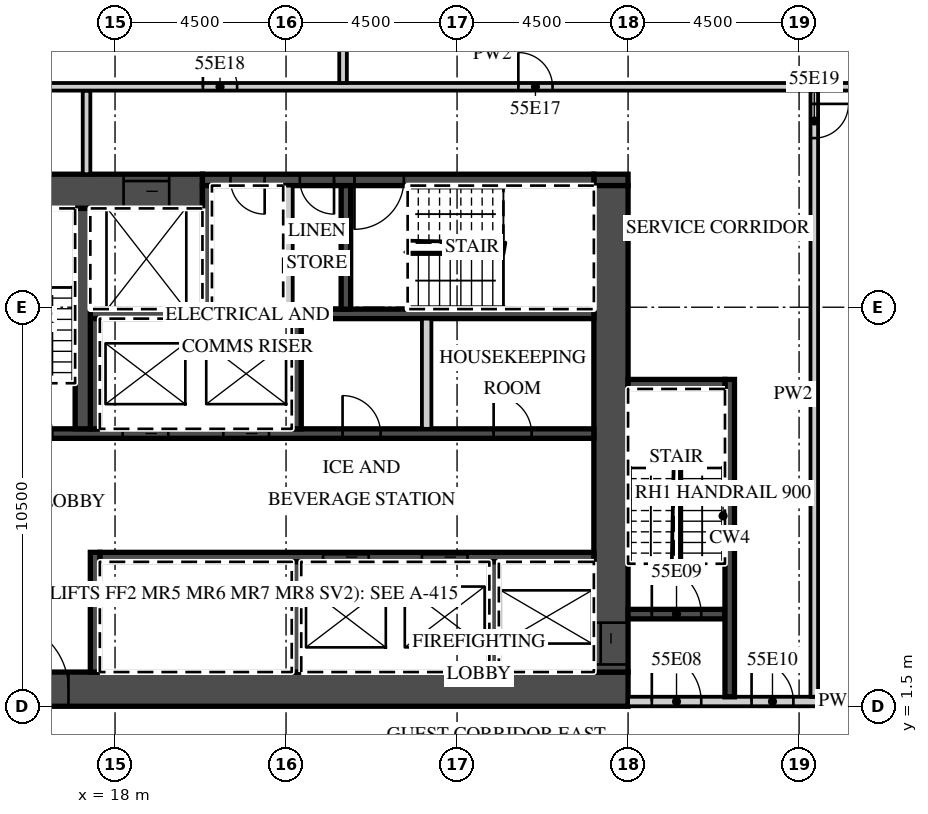
"""IFC4 building model, lengths in metres.
Left out: names, types, materials, properties, quantities, classifications, styles, units other than length and angle.
Written with IfcOpenShell. Run it as: python <this file> out.ifc"""

import sys

from ifc_helpers import new_model, si_unit, direction, frame, frame_2d, origin, place, context, subcontext, project, spatial, rectangle, extrude, element, fill, save


model = new_model("IFC4")
c1 = context("Model", 3, precision=1e-05, world=origin(), true_north=direction((0.0, 1.0)))
c2 = subcontext(c1, "Body", "Model", "MODEL_VIEW")
j1 = project(units=[si_unit("LENGTHUNIT", "METRE"), si_unit("PLANEANGLEUNIT", "RADIAN")], contexts=[c1])
p1 = place(None, origin())
s1 = spatial("IfcSite", under=j1, at=p1, CompositionType="ELEMENT")
p2 = place(p1, origin())
s2 = spatial("IfcBuilding", under=s1, at=p2, CompositionType="ELEMENT")
p3 = place(p2, frame((0.0, 0.0, 227.6)))
s3 = spatial("IfcBuildingStorey", under=s2, at=p3, CompositionType="ELEMENT", Elevation=227.6)
p4 = place(p3, frame((13.5, 1.95, 0.0), z_axis=(0.0, 0.0, 1.0), x_axis=(1.0, 0.0, 0.0)))
e1 = element("IfcWall", 1, at=p4, inside=s3, PredefinedType="SHEAR", context=c2, shape_type="SweptSolid", body=[
    extrude(rectangle(XDim=18.0, YDim=0.9, at=frame_2d((9.0, 0.0))), origin(), (0.0, 0.0, 1.0), 3.02),
])
p5 = place(p4, frame((1.475, 0.0, 0.0)))
e2 = element("IfcOpeningElement", 2, at=p5, cuts=e1, PredefinedType="OPENING", context=c2, shape_type="SweptSolid", body=[
    extrude(rectangle(XDim=1.8, YDim=2.1, at=frame_2d((0.9, 1.05))), frame((0.0, 0.46, 0.0), z_axis=(0.0, -1.0, 0.0), x_axis=(1.0, 0.0, 0.0)), (0.0, 0.0, 1.0), 0.92),
])
p6 = place(p3, frame((13.5, 15.05, 0.0), z_axis=(0.0, 0.0, 1.0), x_axis=(1.0, 0.0, 0.0)))
e3 = element("IfcWall", 3, at=p6, inside=s3, PredefinedType="SHEAR", context=c2, shape_type="SweptSolid", body=[
    extrude(rectangle(XDim=6.8, YDim=0.9, at=frame_2d((3.4, 0.0))), origin(), (0.0, 0.0, 1.0), 3.02),
])
p7 = place(p6, frame((4.725, 0.0, 0.0)))
e4 = element("IfcOpeningElement", 4, at=p7, cuts=e3, PredefinedType="OPENING", context=c2, shape_type="SweptSolid", body=[
    extrude(rectangle(XDim=1.2, YDim=2.1, at=frame_2d((0.6, 1.05))), frame((0.0, 0.46, 0.0), z_axis=(0.0, -1.0, 0.0), x_axis=(1.0, 0.0, 0.0)), (0.0, 0.0, 1.0), 0.92),
])
p8 = place(p3, frame((30.6, 15.35, 0.0), z_axis=(0.0, 0.0, 1.0), x_axis=(1.0, 0.0, 0.0)))
e5 = element("IfcWall", 5, at=p8, inside=s3, PredefinedType="SHEAR", context=c2, shape_type="SweptSolid", body=[
    extrude(rectangle(XDim=0.9, YDim=0.3, at=frame_2d((0.45, 0.0))), origin(), (0.0, 0.0, 1.0), 3.02),
])
p9 = place(p3, frame((20.3, 15.35, 0.0), z_axis=(0.0, 0.0, 1.0), x_axis=(1.0, 0.0, 0.0)))
e6 = element("IfcWall", 6, at=p9, inside=s3, PredefinedType="SHEAR", context=c2, shape_type="SweptSolid", body=[
    extrude(rectangle(XDim=10.3, YDim=0.3, at=frame_2d((5.15, 0.0))), origin(), (0.0, 0.0, 1.0), 3.02),
])
p10 = place(p9, frame((4.0, 0.0, 0.0)))
e7 = element("IfcOpeningElement", 7, at=p10, cuts=e6, PredefinedType="OPENING", context=c2, shape_type="SweptSolid", body=[
    extrude(rectangle(XDim=1.3, YDim=2.1, at=frame_2d((0.65, 1.05))), frame((0.0, 0.16, 0.0), z_axis=(0.0, -1.0, 0.0), x_axis=(1.0, 0.0, 0.0)), (0.0, 0.0, 1.0), 0.32),
])
p11 = place(p9, frame((2.562, 0.0, 0.0)))
e8 = element("IfcOpeningElement", 8, at=p11, cuts=e6, PredefinedType="OPENING", context=c2, shape_type="SweptSolid", body=[
    extrude(rectangle(XDim=0.9, YDim=2.1, at=frame_2d((0.45, 1.05))), frame((0.0, 0.16, 0.0), z_axis=(0.0, -1.0, 0.0), x_axis=(1.0, 0.0, 0.0)), (0.0, 0.0, 1.0), 0.32),
])
p12 = place(p9, frame((0.738, 0.0, 0.0)))
e9 = element("IfcOpeningElement", 9, at=p12, cuts=e6, PredefinedType="OPENING", context=c2, shape_type="SweptSolid", body=[
    extrude(rectangle(XDim=0.9, YDim=2.1, at=frame_2d((0.45, 1.05))), frame((0.0, 0.16, 0.0), z_axis=(0.0, -1.0, 0.0), x_axis=(1.0, 0.0, 0.0)), (0.0, 0.0, 1.0), 0.32),
])
p13 = place(p3, frame((31.05, 2.4, 0.0), z_axis=(0.0, 0.0, 1.0), x_axis=(0.0, 1.0, 0.0)))
e10 = element("IfcWall", 10, at=p13, inside=s3, PredefinedType="SHEAR", context=c2, shape_type="SweptSolid", body=[
    extrude(rectangle(XDim=12.8, YDim=0.9, at=frame_2d((6.4, 0.0))), origin(), (0.0, 0.0, 1.0), 3.02),
])
p14 = place(p13, frame((0.2, 0.0, 0.0)))
e11 = element("IfcOpeningElement", 11, at=p14, cuts=e10, PredefinedType="OPENING", context=c2, shape_type="SweptSolid", body=[
    extrude(rectangle(XDim=1.1, YDim=2.1, at=frame_2d((0.55, 1.05))), frame((0.0, 0.46, 0.0), z_axis=(0.0, -1.0, 0.0), x_axis=(1.0, 0.0, 0.0)), (0.0, 0.0, 1.0), 0.92),
])
p15 = place(p3, frame((17.6, 5.425, 0.0), z_axis=(0.0, 0.0, 1.0), x_axis=(1.0, 0.0, 0.0)))
e12 = element("IfcWall", 12, at=p15, inside=s3, PredefinedType="SHEAR", context=c2, shape_type="SweptSolid", body=[
    extrude(rectangle(XDim=13.0, YDim=0.25, at=frame_2d((6.5, 0.0))), origin(), (0.0, 0.0, 1.0), 3.02),
])
p16 = place(p15, frame((8.475, 0.0, 0.0)))
e13 = element("IfcOpeningElement", 13, at=p16, cuts=e12, PredefinedType="OPENING", context=c2, shape_type="SweptSolid", body=[
    extrude(rectangle(XDim=1.2, YDim=2.1, at=frame_2d((0.6, 1.05))), frame((0.0, 0.135, 0.0), z_axis=(0.0, -1.0, 0.0), x_axis=(1.0, 0.0, 0.0)), (0.0, 0.0, 1.0), 0.27),
])
p17 = place(p15, frame((5.875, 0.0, 0.0)))
e14 = element("IfcOpeningElement", 14, at=p17, cuts=e12, PredefinedType="OPENING", context=c2, shape_type="SweptSolid", body=[
    extrude(rectangle(XDim=1.2, YDim=2.1, at=frame_2d((0.6, 1.05))), frame((0.0, 0.135, 0.0), z_axis=(0.0, -1.0, 0.0), x_axis=(1.0, 0.0, 0.0)), (0.0, 0.0, 1.0), 0.27),
])
p18 = place(p3, frame((17.475, 2.4, 0.0), z_axis=(0.0, 0.0, 1.0), x_axis=(0.0, 1.0, 0.0)))
e15 = element("IfcWall", 15, at=p18, inside=s3, PredefinedType="SHEAR", context=c2, shape_type="SweptSolid", body=[
    extrude(rectangle(XDim=3.15, YDim=0.25, at=frame_2d((1.575, 0.0))), origin(), (0.0, 0.0, 1.0), 3.02),
])
for number, where, z_axis, x_axis in (
    (16, (27.975, 2.4, 0.0), (0.0, 0.0, 1.0), (0.0, 1.0, 0.0)),
    (17, (22.775, 2.4, 0.0), (0.0, 0.0, 1.0), (0.0, 1.0, 0.0)),
):
    element("IfcWall", number, at=place(p3, frame(where, z_axis=z_axis, x_axis=x_axis)), inside=s3, PredefinedType="SHEAR", context=c2, shape_type="SweptSolid", body=[
        extrude(rectangle(XDim=2.9, YDim=0.25, at=frame_2d((1.45, 0.0))), origin(), (0.0, 0.0, 1.0), 3.02),
    ])
p19 = place(p3, frame((14.4, 8.675, 0.0), z_axis=(0.0, 0.0, 1.0), x_axis=(1.0, 0.0, 0.0)))
e18 = element("IfcWall", 18, at=p19, inside=s3, PredefinedType="SHEAR", context=c2, shape_type="SweptSolid", body=[
    extrude(rectangle(XDim=16.2, YDim=0.25, at=frame_2d((8.1, 0.0))), origin(), (0.0, 0.0, 1.0), 3.02),
])
p20 = place(p19, frame((6.45, 0.0, 0.0)))
e19 = element("IfcOpeningElement", 19, at=p20, cuts=e18, PredefinedType="OPENING", context=c2, shape_type="SweptSolid", body=[
    extrude(rectangle(XDim=1.2, YDim=2.1, at=frame_2d((0.6, 1.05))), frame((0.0, 0.135, 0.0), z_axis=(0.0, -1.0, 0.0), x_axis=(1.0, 0.0, 0.0)), (0.0, 0.0, 1.0), 0.27),
])
p21 = place(p19, frame((3.8, 0.0, 0.0)))
e20 = element("IfcOpeningElement", 20, at=p21, cuts=e18, PredefinedType="OPENING", context=c2, shape_type="SweptSolid", body=[
    extrude(rectangle(XDim=1.2, YDim=2.1, at=frame_2d((0.6, 1.05))), frame((0.0, 0.135, 0.0), z_axis=(0.0, -1.0, 0.0), x_axis=(1.0, 0.0, 0.0)), (0.0, 0.0, 1.0), 0.27),
])
p22 = place(p19, frame((0.65, 0.0, 0.0)))
e21 = element("IfcOpeningElement", 21, at=p22, cuts=e18, PredefinedType="OPENING", context=c2, shape_type="SweptSolid", body=[
    extrude(rectangle(XDim=1.3, YDim=2.1, at=frame_2d((0.65, 1.05))), frame((0.0, 0.135, 0.0), z_axis=(0.0, -1.0, 0.0), x_axis=(1.0, 0.0, 0.0)), (0.0, 0.0, 1.0), 0.27),
])
p23 = place(p19, frame((13.562, 0.0, 0.0)))
e22 = element("IfcOpeningElement", 22, at=p23, cuts=e18, PredefinedType="OPENING", context=c2, shape_type="SweptSolid", body=[
    extrude(rectangle(XDim=1.0, YDim=2.1, at=frame_2d((0.5, 1.05))), frame((0.0, 0.135, 0.0), z_axis=(0.0, -1.0, 0.0), x_axis=(1.0, 0.0, 0.0)), (0.0, 0.0, 1.0), 0.27),
])
p24 = place(p19, frame((9.587, 0.0, 0.0)))
e23 = element("IfcOpeningElement", 23, at=p24, cuts=e18, PredefinedType="OPENING", context=c2, shape_type="SweptSolid", body=[
    extrude(rectangle(XDim=1.0, YDim=2.1, at=frame_2d((0.5, 1.05))), frame((0.0, 0.135, 0.0), z_axis=(0.0, -1.0, 0.0), x_axis=(1.0, 0.0, 0.0)), (0.0, 0.0, 1.0), 0.27),
])
p25 = place(p3, frame((17.35, 11.825, 0.0), z_axis=(0.0, 0.0, 1.0), x_axis=(1.0, 0.0, 0.0)))
e24 = element("IfcWall", 24, at=p25, inside=s3, PredefinedType="SHEAR", context=c2, shape_type="SweptSolid", body=[
    extrude(rectangle(XDim=13.25, YDim=0.25, at=frame_2d((6.625, 0.0))), origin(), (0.0, 0.0, 1.0), 3.02),
])
for number, where, z_axis, x_axis in (
    (25, (17.475, 8.8, 0.0), (0.0, 0.0, 1.0), (0.0, 1.0, 0.0)),
    (26, (22.775, 8.8, 0.0), (0.0, 0.0, 1.0), (0.0, 1.0, 0.0)),
):
    element("IfcWall", number, at=place(p3, frame(where, z_axis=z_axis, x_axis=x_axis)), inside=s3, PredefinedType="SHEAR", context=c2, shape_type="SweptSolid", body=[
        extrude(rectangle(XDim=2.9, YDim=0.25, at=frame_2d((1.45, 0.0))), origin(), (0.0, 0.0, 1.0), 3.02),
    ])
p26 = place(p3, frame((26.2, 8.8, 0.0), z_axis=(0.0, 0.0, 1.0), x_axis=(0.0, 1.0, 0.0)))
e27 = element("IfcWall", 27, at=p26, inside=s3, PredefinedType="PARTITIONING", context=c2, shape_type="SweptSolid", body=[
    extrude(rectangle(XDim=2.9, YDim=0.25, at=frame_2d((1.45, 0.0))), origin(), (0.0, 0.0, 1.0), 3.02),
])
p27 = place(p3, frame((17.15, 8.8, 0.0), z_axis=(0.0, 0.0, 1.0), x_axis=(0.0, 1.0, 0.0)))
e28 = element("IfcWall", 28, at=p27, inside=s3, PredefinedType="SHEAR", context=c2, shape_type="SweptSolid", body=[
    extrude(rectangle(XDim=5.8, YDim=0.4, at=frame_2d((2.9, 0.0))), origin(), (0.0, 0.0, 1.0), 3.02),
])
for number, where, z_axis, x_axis in (
    (29, (20.425, 11.95, 0.0), (0.0, 0.0, 1.0), (0.0, 1.0, 0.0)),
    (30, (24.075, 11.95, 0.0), (0.0, 0.0, 1.0), (0.0, 1.0, 0.0)),
):
    element("IfcWall", number, at=place(p3, frame(where, z_axis=z_axis, x_axis=x_axis)), inside=s3, PredefinedType="SHEAR", context=c2, shape_type="SweptSolid", body=[
        extrude(rectangle(XDim=3.25, YDim=0.25, at=frame_2d((1.625, 0.0))), origin(), (0.0, 0.0, 1.0), 3.02),
    ])
p28 = place(p3, frame((22.55, 11.95, 0.0), z_axis=(0.0, 0.0, 1.0), x_axis=(0.0, 1.0, 0.0)))
e31 = element("IfcWall", 31, at=p28, inside=s3, PredefinedType="PARTITIONING", context=c2, shape_type="SweptSolid", body=[
    extrude(rectangle(XDim=3.25, YDim=0.25, at=frame_2d((1.625, 0.0))), origin(), (0.0, 0.0, 1.0), 3.02),
])
p29 = place(p3, frame((31.5, 1.625, 0.0), z_axis=(0.0, 0.0, 1.0), x_axis=(1.0, 0.0, 0.0)))
e32 = element("IfcWall", 32, at=p29, inside=s3, PredefinedType="PARTITIONING", context=c2, shape_type="SweptSolid", body=[
    extrude(rectangle(XDim=11.04, YDim=0.25, at=frame_2d((5.52, 0.0))), origin(), (0.0, 0.0, 1.0), 3.02),
])
p30 = place(p29, frame((0.625, 0.0, 0.0)))
e33 = element("IfcOpeningElement", 33, at=p30, cuts=e32, PredefinedType="OPENING", context=c2, shape_type="SweptSolid", body=[
    extrude(rectangle(XDim=1.3, YDim=2.1, at=frame_2d((0.65, 1.05))), frame((0.0, 0.135, 0.0), z_axis=(0.0, -1.0, 0.0), x_axis=(1.0, 0.0, 0.0)), (0.0, 0.0, 1.0), 0.27),
])
p31 = place(p29, frame((3.25, 0.0, 0.0)))
e34 = element("IfcOpeningElement", 34, at=p31, cuts=e32, PredefinedType="OPENING", context=c2, shape_type="SweptSolid", body=[
    extrude(rectangle(XDim=1.1, YDim=2.1, at=frame_2d((0.55, 1.05))), frame((0.0, 0.135, 0.0), z_axis=(0.0, -1.0, 0.0), x_axis=(1.0, 0.0, 0.0)), (0.0, 0.0, 1.0), 0.27),
])
p32 = place(p3, frame((31.5, 3.925, 0.0), z_axis=(0.0, 0.0, 1.0), x_axis=(1.0, 0.0, 0.0)))
e35 = element("IfcWall", 35, at=p32, inside=s3, PredefinedType="SHEAR", context=c2, shape_type="SweptSolid", body=[
    extrude(rectangle(XDim=2.55, YDim=0.25, at=frame_2d((1.275, 0.0))), origin(), (0.0, 0.0, 1.0), 3.02),
])
p33 = place(p32, frame((0.625, 0.0, 0.0)))
e36 = element("IfcOpeningElement", 36, at=p33, cuts=e35, PredefinedType="OPENING", context=c2, shape_type="SweptSolid", body=[
    extrude(rectangle(XDim=1.3, YDim=2.1, at=frame_2d((0.65, 1.05))), frame((0.0, 0.135, 0.0), z_axis=(0.0, -1.0, 0.0), x_axis=(1.0, 0.0, 0.0)), (0.0, 0.0, 1.0), 0.27),
])
p34 = place(p3, frame((34.175, 1.75, 0.0), z_axis=(0.0, 0.0, 1.0), x_axis=(0.0, 1.0, 0.0)))
e37 = element("IfcWall", 37, at=p34, inside=s3, PredefinedType="SHEAR", context=c2, shape_type="SweptSolid", body=[
    extrude(rectangle(XDim=8.35, YDim=0.25, at=frame_2d((4.175, 0.0))), origin(), (0.0, 0.0, 1.0), 3.02),
])
p35 = place(p3, frame((31.5, 9.975, 0.0), z_axis=(0.0, 0.0, 1.0), x_axis=(1.0, 0.0, 0.0)))
e38 = element("IfcWall", 38, at=p35, inside=s3, PredefinedType="SHEAR", context=c2, shape_type="SweptSolid", body=[
    extrude(rectangle(XDim=2.55, YDim=0.25, at=frame_2d((1.275, 0.0))), origin(), (0.0, 0.0, 1.0), 3.02),
])
p36 = place(p3, frame((17.25, 15.5, 0.0), z_axis=(0.0, 0.0, 1.0), x_axis=(0.0, 1.0, 0.0)))
e39 = element("IfcWall", 39, at=p36, inside=s3, PredefinedType="PARTITIONING", context=c2, shape_type="SweptSolid", body=[
    extrude(rectangle(XDim=2.2, YDim=0.2, at=frame_2d((1.1, 0.0))), origin(), (0.0, 0.0, 1.0), 3.02),
])
p37 = place(p3, frame((36.4, 1.75, 0.0), z_axis=(0.0, 0.0, 1.0), x_axis=(0.0, 1.0, 0.0)))
e40 = element("IfcWall", 40, at=p37, inside=s3, PredefinedType="PARTITIONING", context=c2, shape_type="SweptSolid", body=[
    extrude(rectangle(XDim=15.95, YDim=0.2, at=frame_2d((7.975, 0.0))), origin(), (0.0, 0.0, 1.0), 3.02),
])
p38 = place(p37, frame((14.7, 0.0, 0.0)))
e41 = element("IfcOpeningElement", 41, at=p38, cuts=e40, PredefinedType="OPENING", context=c2, shape_type="SweptSolid", body=[
    extrude(rectangle(XDim=0.9, YDim=2.1, at=frame_2d((0.45, 1.05))), frame((0.0, 0.11, 0.0), z_axis=(0.0, -1.0, 0.0), x_axis=(1.0, 0.0, 0.0)), (0.0, 0.0, 1.0), 0.22),
])
p39 = place(p3, frame((13.6, 17.8, 0.0), z_axis=(0.0, 0.0, 1.0), x_axis=(1.0, 0.0, 0.0)))
e42 = element("IfcWall", 42, at=p39, inside=s3, PredefinedType="PARTITIONING", context=c2, shape_type="SweptSolid", body=[
    extrude(rectangle(XDim=28.657, YDim=0.2, at=frame_2d((14.329, 0.0))), origin(), (0.0, 0.0, 1.0), 3.02),
])
p40 = place(p39, frame((15.012, 0.0, 0.0)))
e43 = element("IfcOpeningElement", 43, at=p40, cuts=e42, PredefinedType="OPENING", context=c2, shape_type="SweptSolid", body=[
    extrude(rectangle(XDim=0.9, YDim=2.1, at=frame_2d((0.45, 1.05))), frame((0.0, 0.11, 0.0), z_axis=(0.0, -1.0, 0.0), x_axis=(1.0, 0.0, 0.0)), (0.0, 0.0, 1.0), 0.22),
])
p41 = place(p39, frame((6.712, 0.0, 0.0)))
e44 = element("IfcOpeningElement", 44, at=p41, cuts=e42, PredefinedType="OPENING", context=c2, shape_type="SweptSolid", body=[
    extrude(rectangle(XDim=0.9, YDim=2.1, at=frame_2d((0.45, 1.05))), frame((0.0, 0.11, 0.0), z_axis=(0.0, -1.0, 0.0), x_axis=(1.0, 0.0, 0.0)), (0.0, 0.0, 1.0), 0.22),
])
p42 = place(p3, frame((24.0, 17.9, 0.0), z_axis=(0.0, 0.0, 1.0), x_axis=(0.0, 1.0, 0.0)))
e45 = element("IfcWall", 45, at=p42, inside=s3, PredefinedType="PARTITIONING", context=c2, shape_type="SweptSolid", body=[
    extrude(rectangle(XDim=3.22, YDim=0.2, at=frame_2d((1.61, 0.0))), origin(), (0.0, 0.0, 1.0), 3.02),
])
p43 = place(p20, origin())
e46 = element("IfcDoor", 46, at=p43, inside=s3, OperationType="SLIDING_TO_LEFT", PredefinedType="DOOR", context=c2, shape_type="SweptSolid", body=[
    extrude(rectangle(XDim=1.2, YDim=2.1, at=frame_2d((0.6, 1.05))), frame((0.0, 0.025, 0.0), z_axis=(0.0, -1.0, 0.0), x_axis=(1.0, 0.0, 0.0)), (0.0, 0.0, 1.0), 0.05),
])
fill(e19, e46)
p44 = place(p21, origin())
e47 = element("IfcDoor", 47, at=p44, inside=s3, OperationType="SLIDING_TO_RIGHT", PredefinedType="DOOR", context=c2, shape_type="SweptSolid", body=[
    extrude(rectangle(XDim=1.2, YDim=2.1, at=frame_2d((0.6, 1.05))), frame((0.0, 0.025, 0.0), z_axis=(0.0, -1.0, 0.0), x_axis=(1.0, 0.0, 0.0)), (0.0, 0.0, 1.0), 0.05),
])
fill(e20, e47)
p45 = place(p16, origin())
e48 = element("IfcDoor", 48, at=p45, inside=s3, OperationType="SLIDING_TO_LEFT", PredefinedType="DOOR", context=c2, shape_type="SweptSolid", body=[
    extrude(rectangle(XDim=1.2, YDim=2.1, at=frame_2d((0.6, 1.05))), frame((0.0, 0.025, 0.0), z_axis=(0.0, -1.0, 0.0), x_axis=(1.0, 0.0, 0.0)), (0.0, 0.0, 1.0), 0.05),
])
fill(e13, e48)
p46 = place(p17, origin())
e49 = element("IfcDoor", 49, at=p46, inside=s3, OperationType="SLIDING_TO_RIGHT", PredefinedType="DOOR", context=c2, shape_type="SweptSolid", body=[
    extrude(rectangle(XDim=1.2, YDim=2.1, at=frame_2d((0.6, 1.05))), frame((0.0, 0.025, 0.0), z_axis=(0.0, -1.0, 0.0), x_axis=(1.0, 0.0, 0.0)), (0.0, 0.0, 1.0), 0.05),
])
fill(e14, e49)
p47 = place(p7, origin())
e50 = element("IfcDoor", 50, at=p47, inside=s3, OperationType="SLIDING_TO_LEFT", PredefinedType="DOOR", context=c2, shape_type="SweptSolid", body=[
    extrude(rectangle(XDim=1.2, YDim=2.1, at=frame_2d((0.6, 1.05))), frame((0.0, 0.025, 0.0), z_axis=(0.0, -1.0, 0.0), x_axis=(1.0, 0.0, 0.0)), (0.0, 0.0, 1.0), 0.05),
])
fill(e4, e50)
p48 = place(p14, origin())
e51 = element("IfcDoor", 51, at=p48, inside=s3, OperationType="SLIDING_TO_LEFT", PredefinedType="DOOR", context=c2, shape_type="SweptSolid", body=[
    extrude(rectangle(XDim=1.1, YDim=2.1, at=frame_2d((0.55, 1.05))), frame((0.0, 0.025, 0.0), z_axis=(0.0, -1.0, 0.0), x_axis=(1.0, 0.0, 0.0)), (0.0, 0.0, 1.0), 0.05),
])
fill(e11, e51)
p49 = place(p5, origin())
e52 = element("IfcDoor", 52, at=p49, inside=s3, OperationType="DOUBLE_DOOR_DOUBLE_SWING", PredefinedType="DOOR", context=c2, shape_type="SweptSolid", body=[
    extrude(rectangle(XDim=1.8, YDim=2.1, at=frame_2d((0.9, 1.05))), frame((0.0, 0.025, 0.0), z_axis=(0.0, -1.0, 0.0), x_axis=(1.0, 0.0, 0.0)), (0.0, 0.0, 1.0), 0.05),
])
fill(e2, e52)
p50 = place(p30, origin())
e53 = element("IfcDoor", 53, at=p50, inside=s3, OperationType="SINGLE_SWING_LEFT", PredefinedType="DOOR", context=c2, shape_type="SweptSolid", body=[
    extrude(rectangle(XDim=1.3, YDim=2.1, at=frame_2d((0.65, 1.05))), frame((0.0, 0.025, 0.0), z_axis=(0.0, -1.0, 0.0), x_axis=(1.0, 0.0, 0.0)), (0.0, 0.0, 1.0), 0.05),
])
fill(e33, e53)
p51 = place(p33, origin())
e54 = element("IfcDoor", 54, at=p51, inside=s3, OperationType="SINGLE_SWING_LEFT", PredefinedType="DOOR", context=c2, shape_type="SweptSolid", body=[
    extrude(rectangle(XDim=1.3, YDim=2.1, at=frame_2d((0.65, 1.05))), frame((0.0, 0.025, 0.0), z_axis=(0.0, -1.0, 0.0), x_axis=(1.0, 0.0, 0.0)), (0.0, 0.0, 1.0), 0.05),
])
fill(e36, e54)
p52 = place(p31, origin())
e55 = element("IfcDoor", 55, at=p52, inside=s3, OperationType="SINGLE_SWING_LEFT", PredefinedType="DOOR", context=c2, shape_type="SweptSolid", body=[
    extrude(rectangle(XDim=1.1, YDim=2.1, at=frame_2d((0.55, 1.05))), frame((0.0, 0.025, 0.0), z_axis=(0.0, -1.0, 0.0), x_axis=(1.0, 0.0, 0.0)), (0.0, 0.0, 1.0), 0.05),
])
fill(e34, e55)
p53 = place(p10, origin())
e56 = element("IfcDoor", 56, at=p53, inside=s3, OperationType="SINGLE_SWING_LEFT", PredefinedType="DOOR", context=c2, shape_type="SweptSolid", body=[
    extrude(rectangle(XDim=1.3, YDim=2.1, at=frame_2d((0.65, 1.05))), frame((0.0, 0.025, 0.0), z_axis=(0.0, -1.0, 0.0), x_axis=(1.0, 0.0, 0.0)), (0.0, 0.0, 1.0), 0.05),
])
fill(e7, e56)
p54 = place(p11, origin())
e57 = element("IfcDoor", 57, at=p54, inside=s3, OperationType="SINGLE_SWING_RIGHT", PredefinedType="DOOR", context=c2, shape_type="SweptSolid", body=[
    extrude(rectangle(XDim=0.9, YDim=2.1, at=frame_2d((0.45, 1.05))), frame((0.0, 0.025, 0.0), z_axis=(0.0, -1.0, 0.0), x_axis=(1.0, 0.0, 0.0)), (0.0, 0.0, 1.0), 0.05),
])
fill(e8, e57)
p55 = place(p12, origin())
e58 = element("IfcDoor", 58, at=p55, inside=s3, OperationType="SINGLE_SWING_RIGHT", PredefinedType="DOOR", context=c2, shape_type="SweptSolid", body=[
    extrude(rectangle(XDim=0.9, YDim=2.1, at=frame_2d((0.45, 1.05))), frame((0.0, 0.025, 0.0), z_axis=(0.0, -1.0, 0.0), x_axis=(1.0, 0.0, 0.0)), (0.0, 0.0, 1.0), 0.05),
])
fill(e9, e58)
p56 = place(p23, origin())
e59 = element("IfcDoor", 59, at=p56, inside=s3, OperationType="SINGLE_SWING_LEFT", PredefinedType="DOOR", context=c2, shape_type="SweptSolid", body=[
    extrude(rectangle(XDim=1.0, YDim=2.1, at=frame_2d((0.5, 1.05))), frame((0.0, 0.025, 0.0), z_axis=(0.0, -1.0, 0.0), x_axis=(1.0, 0.0, 0.0)), (0.0, 0.0, 1.0), 0.05),
])
fill(e22, e59)
p57 = place(p24, origin())
e60 = element("IfcDoor", 60, at=p57, inside=s3, OperationType="SINGLE_SWING_LEFT", PredefinedType="DOOR", context=c2, shape_type="SweptSolid", body=[
    extrude(rectangle(XDim=1.0, YDim=2.1, at=frame_2d((0.5, 1.05))), frame((0.0, 0.025, 0.0), z_axis=(0.0, -1.0, 0.0), x_axis=(1.0, 0.0, 0.0)), (0.0, 0.0, 1.0), 0.05),
])
fill(e23, e60)
p58 = place(p40, origin())
e61 = element("IfcDoor", 61, at=p58, inside=s3, OperationType="SINGLE_SWING_LEFT", PredefinedType="DOOR", context=c2, shape_type="SweptSolid", body=[
    extrude(rectangle(XDim=0.9, YDim=2.1, at=frame_2d((0.45, 1.05))), frame((0.0, 0.025, 0.0), z_axis=(0.0, -1.0, 0.0), x_axis=(1.0, 0.0, 0.0)), (0.0, 0.0, 1.0), 0.05),
])
fill(e43, e61)
p59 = place(p41, origin())
e62 = element("IfcDoor", 62, at=p59, inside=s3, OperationType="SINGLE_SWING_LEFT", PredefinedType="DOOR", context=c2, shape_type="SweptSolid", body=[
    extrude(rectangle(XDim=0.9, YDim=2.1, at=frame_2d((0.45, 1.05))), frame((0.0, 0.025, 0.0), z_axis=(0.0, -1.0, 0.0), x_axis=(1.0, 0.0, 0.0)), (0.0, 0.0, 1.0), 0.05),
])
fill(e44, e62)
p60 = place(p38, origin())
e63 = element("IfcDoor", 63, at=p60, inside=s3, OperationType="SINGLE_SWING_RIGHT", PredefinedType="DOOR", context=c2, shape_type="SweptSolid", body=[
    extrude(rectangle(XDim=0.9, YDim=2.1, at=frame_2d((0.45, 1.05))), frame((0.0, 0.025, 0.0), z_axis=(0.0, -1.0, 0.0), x_axis=(1.0, 0.0, 0.0)), (0.0, 0.0, 1.0), 0.05),
])
fill(e41, e63)
save(model, sys.argv[1])
